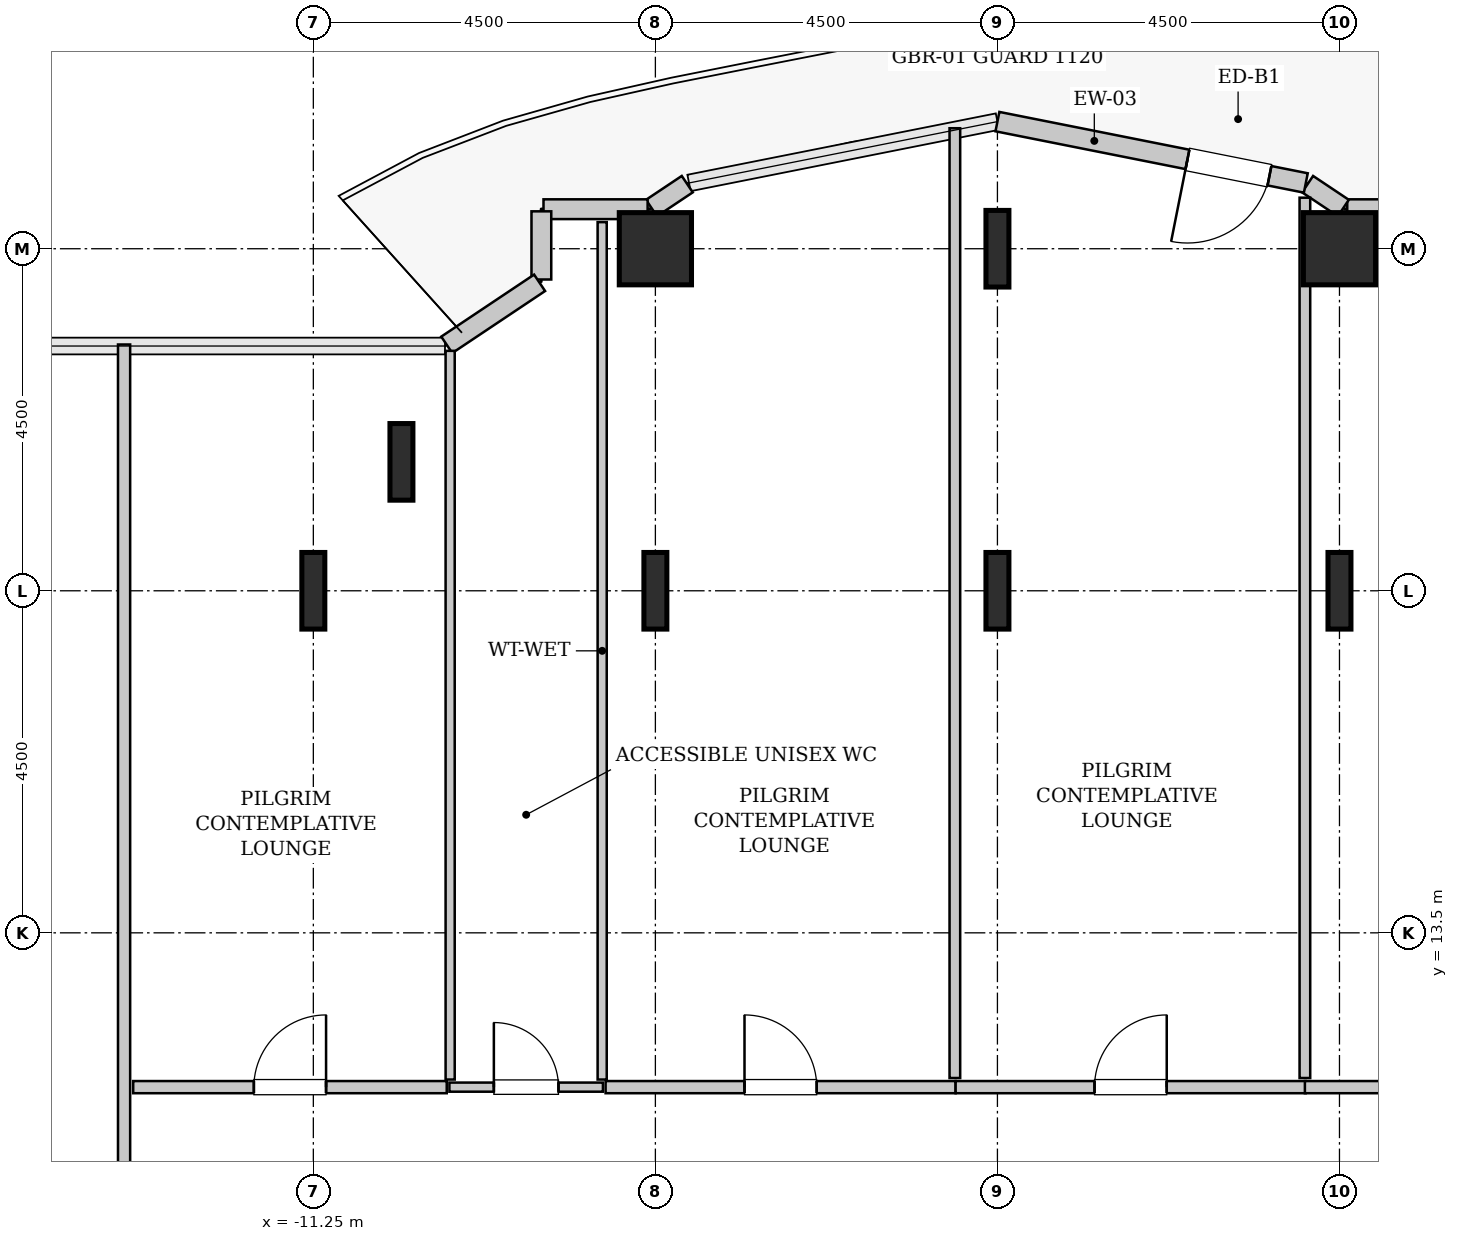
"""IFC4 building model, lengths in metres.
Left out: names, types, materials, properties, quantities, classifications, styles, units other than length and angle.
Written with IfcOpenShell. Run it as: python <this file> out.ifc"""

import sys

from ifc_helpers import new_model, si_unit, direction, frame, frame_2d, origin, origin_2d, place, context, subcontext, project, spatial, rectangle, hollow_rectangle, i_section, extrude, source, transform, mapped, element, fill, save


model = new_model("IFC4")
c1 = context("Model", 3, precision=1e-05, world=origin(), true_north=direction((0.0, 1.0)))
c2 = subcontext(c1, "Body", "Model", "MODEL_VIEW")
j1 = project(units=[si_unit("LENGTHUNIT", "METRE"), si_unit("PLANEANGLEUNIT", "RADIAN")], contexts=[c1])
p1 = place(None, origin())
s1 = spatial("IfcSite", under=j1, at=p1, CompositionType="ELEMENT")
p2 = place(p1, origin())
s2 = spatial("IfcBuilding", under=s1, at=p2, CompositionType="ELEMENT")
p3 = place(p2, frame((0.0, 0.0, 55.8)))
s3 = spatial("IfcBuildingStorey", under=s2, at=p3, CompositionType="ELEMENT", Elevation=55.8)
m1 = source(origin(), c2, "Body", "SweptSolid", [
    extrude(i_section(OverallWidth=0.302, OverallDepth=1.008, WebThickness=0.021, FlangeThickness=0.04, FilletRadius=0.03, at=origin_2d()), origin(), (0.0, 0.0, 1.0), 3.8),
])
for number, where, z_axis, x_axis in (
    (1, (-11.25, 18.0, 0.0), (0.0, 0.0, 1.0), (1.0, 0.0, 0.0)),
    (2, (-10.091, 19.696, 0.0), (0.0, 0.0, 1.0), (1.0, 0.0, 0.0)),
    (3, (-6.75, 18.0, 0.0), (0.0, 0.0, 1.0), (1.0, 0.0, 0.0)),
):
    element("IfcColumn", number, at=place(p3, frame(where, z_axis=z_axis, x_axis=x_axis)), inside=s3, PredefinedType="COLUMN", context=c2, shape_type="MappedRepresentation", body=[
        mapped(m1, transform((0.0, 0.0, 0.0), x_axis=(1.0, 0.0, 0.0), y_axis=(0.0, 1.0, 0.0), z_axis=(0.0, 0.0, 1.0), scale=1.0)),
    ])
m2 = source(origin(), c2, "Body", "SweptSolid", [
    extrude(hollow_rectangle(XDim=0.95, YDim=0.95, WallThickness=0.045, InnerFilletRadius=0.045, OuterFilletRadius=0.09, at=origin_2d()), origin(), (0.0, 0.0, 1.0), 3.8),
])
p4 = place(p3, frame((-6.75, 22.5, 0.0), z_axis=(0.0, 0.0, 1.0), x_axis=(1.0, 0.0, 0.0)))
e4 = element("IfcColumn", 4, at=p4, inside=s3, PredefinedType="COLUMN", context=c2, shape_type="MappedRepresentation", body=[
    mapped(m2, transform((0.0, 0.0, 0.0), x_axis=(1.0, 0.0, 0.0), y_axis=(0.0, 1.0, 0.0), z_axis=(0.0, 0.0, 1.0), scale=1.0)),
])
for number, where, z_axis, x_axis in (
    (5, (-2.25, 18.0, 0.0), (0.0, 0.0, 1.0), (1.0, 0.0, 0.0)),
    (6, (-2.25, 22.5, 0.0), (0.0, 0.0, 1.0), (1.0, 0.0, 0.0)),
    (7, (2.25, 18.0, 0.0), (0.0, 0.0, 1.0), (1.0, 0.0, 0.0)),
):
    element("IfcColumn", number, at=place(p3, frame(where, z_axis=z_axis, x_axis=x_axis)), inside=s3, PredefinedType="COLUMN", context=c2, shape_type="MappedRepresentation", body=[
        mapped(m1, transform((0.0, 0.0, 0.0), x_axis=(1.0, 0.0, 0.0), y_axis=(0.0, 1.0, 0.0), z_axis=(0.0, 0.0, 1.0), scale=1.0)),
    ])
p5 = place(p3, frame((2.25, 22.5, 0.0), z_axis=(0.0, 0.0, 1.0), x_axis=(1.0, 0.0, 0.0)))
e8 = element("IfcColumn", 8, at=p5, inside=s3, PredefinedType="COLUMN", context=c2, shape_type="MappedRepresentation", body=[
    mapped(m2, transform((0.0, 0.0, 0.0), x_axis=(1.0, 0.0, 0.0), y_axis=(0.0, 1.0, 0.0), z_axis=(0.0, 0.0, 1.0), scale=1.0)),
])
m3 = source(origin(), c2, "Body", "SweptSolid", [
    extrude(rectangle(XDim=1.37, YDim=0.26, at=frame_2d((0.685, 0.0))), origin(), (0.0, 0.0, 1.0), 3.55),
])
p6 = place(p3, frame((3.722, 23.02, 0.0), z_axis=(0.0, 0.0, 1.0), x_axis=(-1.0, 0.0, 0.0)))
e9 = element("IfcWall", 9, at=p6, inside=s3, PredefinedType="SOLIDWALL", context=c2, shape_type="MappedRepresentation", body=[
    mapped(m3, transform((0.0, 0.0, 0.0), x_axis=(1.0, 0.0, 0.0), y_axis=(0.0, 1.0, 0.0), z_axis=(0.0, 0.0, 1.0), scale=1.0)),
])
m4 = source(origin(), c2, "Body", "SweptSolid", [
    extrude(rectangle(XDim=0.565, YDim=0.26, at=frame_2d((0.283, 0.0))), origin(), (0.0, 0.0, 1.0), 3.55),
])
p7 = place(p3, frame((2.301, 23.036, 0.0), z_axis=(0.0, 0.0, 1.0), x_axis=(-0.831651492666, 0.555297933317, 0.0)))
e10 = element("IfcWall", 10, at=p7, inside=s3, PredefinedType="SOLIDWALL", context=c2, shape_type="MappedRepresentation", body=[
    mapped(m4, transform((0.0, 0.0, 0.0), x_axis=(1.0, 0.0, 0.0), y_axis=(0.0, 1.0, 0.0), z_axis=(0.0, 0.0, 1.0), scale=1.0)),
])
m5 = source(origin(), c2, "Body", "SweptSolid", [
    extrude(rectangle(XDim=4.137, YDim=0.26, at=frame_2d((2.068, 0.0))), origin(), (0.0, 0.0, 1.0), 3.55),
])
p8 = place(p3, frame((1.807, 23.365, 0.0), z_axis=(0.0, 0.0, 1.0), x_axis=(-0.980782170794, 0.195105954428, 0.0)))
e11 = element("IfcWall", 11, at=p8, inside=s3, PredefinedType="SOLIDWALL", context=c2, shape_type="MappedRepresentation", body=[
    mapped(m5, transform((0.0, 0.0, 0.0), x_axis=(1.0, 0.0, 0.0), y_axis=(0.0, 1.0, 0.0), z_axis=(0.0, 0.0, 1.0), scale=1.0)),
])
p9 = place(p8, frame((0.488, 0.0, 0.0)))
e12 = element("IfcOpeningElement", 12, at=p9, cuts=e11, PredefinedType="OPENING", context=c2, shape_type="SweptSolid", body=[
    extrude(rectangle(XDim=1.1, YDim=2.2, at=frame_2d((0.55, 1.1))), frame((0.0, 0.14, 0.0), z_axis=(0.0, -1.0, 0.0), x_axis=(1.0, 0.0, 0.0)), (0.0, 0.0, 1.0), 0.28),
])
p10 = place(p3, frame((-6.331, 23.35, 0.0), z_axis=(0.0, 0.0, 1.0), x_axis=(-0.831651492666, -0.555297933317, 0.0)))
e13 = element("IfcWall", 13, at=p10, inside=s3, PredefinedType="SOLIDWALL", context=c2, shape_type="MappedRepresentation", body=[
    mapped(m4, transform((0.0, 0.0, 0.0), x_axis=(1.0, 0.0, 0.0), y_axis=(0.0, 1.0, 0.0), z_axis=(0.0, 0.0, 1.0), scale=1.0)),
])
p11 = place(p3, frame((-6.852, 23.02, 0.0), z_axis=(0.0, 0.0, 1.0), x_axis=(-1.0, 0.0, 0.0)))
e14 = element("IfcWall", 14, at=p11, inside=s3, PredefinedType="SOLIDWALL", context=c2, shape_type="MappedRepresentation", body=[
    mapped(m3, transform((0.0, 0.0, 0.0), x_axis=(1.0, 0.0, 0.0), y_axis=(0.0, 1.0, 0.0), z_axis=(0.0, 0.0, 1.0), scale=1.0)),
])
m6 = source(origin(), c2, "Body", "SweptSolid", [
    extrude(rectangle(XDim=0.897, YDim=0.26, at=frame_2d((0.448, 0.0))), origin(), (0.0, 0.0, 1.0), 3.55),
])
p12 = place(p3, frame((-8.25, 22.992, 0.0), z_axis=(0.0, 0.0, 1.0), x_axis=(0.0, -1.0, 0.0)))
e15 = element("IfcWall", 15, at=p12, inside=s3, PredefinedType="SOLIDWALL", context=c2, shape_type="MappedRepresentation", body=[
    mapped(m6, transform((0.0, 0.0, 0.0), x_axis=(1.0, 0.0, 0.0), y_axis=(0.0, 1.0, 0.0), z_axis=(0.0, 0.0, 1.0), scale=1.0)),
])
m7 = source(origin(), c2, "Body", "SweptSolid", [
    extrude(rectangle(XDim=1.469, YDim=0.26, at=frame_2d((0.734, 0.0))), origin(), (0.0, 0.0, 1.0), 3.55),
])
p13 = place(p3, frame((-8.273, 22.052, 0.0), z_axis=(0.0, 0.0, 1.0), x_axis=(-0.831461760506, -0.555581983884, 0.0)))
e16 = element("IfcWall", 16, at=p13, inside=s3, PredefinedType="SOLIDWALL", context=c2, shape_type="MappedRepresentation", body=[
    mapped(m7, transform((0.0, 0.0, 0.0), x_axis=(1.0, 0.0, 0.0), y_axis=(0.0, 1.0, 0.0), z_axis=(0.0, 0.0, 1.0), scale=1.0)),
])
m8 = source(origin(), c2, "Body", "SweptSolid", [
    extrude(rectangle(XDim=2.02, YDim=0.12, at=frame_2d((1.01, 0.0))), origin(), (0.0, 0.0, 1.0), 3.535),
])
p14 = place(p3, frame((-9.46, 11.47, 0.0), z_axis=(0.0, 0.0, 1.0), x_axis=(1.0, 0.0, 0.0)))
e17 = element("IfcWall", 17, at=p14, inside=s3, PredefinedType="PLUMBINGWALL", context=c2, shape_type="MappedRepresentation", body=[
    mapped(m8, transform((0.0, 0.0, 0.0), x_axis=(1.0, 0.0, 0.0), y_axis=(0.0, 1.0, 0.0), z_axis=(0.0, 0.0, 1.0), scale=1.0)),
])
p15 = place(p14, frame((0.585, 0.0, 0.0)))
e18 = element("IfcOpeningElement", 18, at=p15, cuts=e17, PredefinedType="OPENING", context=c2, shape_type="SweptSolid", body=[
    extrude(rectangle(XDim=0.85, YDim=2.1, at=frame_2d((0.425, 1.05))), frame((0.0, 0.07, 0.0), z_axis=(0.0, -1.0, 0.0), x_axis=(1.0, 0.0, 0.0)), (0.0, 0.0, 1.0), 0.14),
])
m9 = source(origin(), c2, "Body", "SweptSolid", [
    extrude(rectangle(XDim=11.28, YDim=0.12, at=frame_2d((5.64, 0.0))), origin(), (0.0, 0.0, 1.0), 3.535),
])
p16 = place(p3, frame((-7.45, 11.57, 0.0), z_axis=(0.0, 0.0, 1.0), x_axis=(0.0, 1.0, 0.0)))
e19 = element("IfcWall", 19, at=p16, inside=s3, PredefinedType="PLUMBINGWALL", context=c2, shape_type="MappedRepresentation", body=[
    mapped(m9, transform((0.0, 0.0, 0.0), x_axis=(1.0, 0.0, 0.0), y_axis=(0.0, 1.0, 0.0), z_axis=(0.0, 0.0, 1.0), scale=1.0)),
])
m10 = source(origin(), c2, "Body", "SweptSolid", [
    extrude(rectangle(XDim=9.587, YDim=0.12, at=frame_2d((4.793, 0.0))), origin(), (0.0, 0.0, 1.0), 3.535),
])
p17 = place(p3, frame((-9.45, 11.57, 0.0), z_axis=(0.0, 0.0, 1.0), x_axis=(0.0, 1.0, 0.0)))
e20 = element("IfcWall", 20, at=p17, inside=s3, PredefinedType="PLUMBINGWALL", context=c2, shape_type="MappedRepresentation", body=[
    mapped(m10, transform((0.0, 0.0, 0.0), x_axis=(1.0, 0.0, 0.0), y_axis=(0.0, 1.0, 0.0), z_axis=(0.0, 0.0, 1.0), scale=1.0)),
])
m11 = source(origin(), c2, "Body", "SweptSolid", [
    extrude(rectangle(XDim=12.752, YDim=0.16, at=frame_2d((6.376, 0.0))), origin(), (0.0, 0.0, 1.0), 3.535),
])
p18 = place(p3, frame((-13.74, 8.488, 0.0), z_axis=(0.0, 0.0, 1.0), x_axis=(0.0, 1.0, 0.0)))
e21 = element("IfcWall", 21, at=p18, inside=s3, PredefinedType="PARTITIONING", context=c2, shape_type="MappedRepresentation", body=[
    mapped(m11, transform((0.0, 0.0, 0.0), x_axis=(1.0, 0.0, 0.0), y_axis=(0.0, 1.0, 0.0), z_axis=(0.0, 0.0, 1.0), scale=1.0)),
])
p19 = place(p18, frame((1.036, 0.0, 0.0)))
e22 = element("IfcOpeningElement", 22, at=p19, cuts=e21, PredefinedType="OPENING", context=c2, shape_type="SweptSolid", body=[
    extrude(rectangle(XDim=0.95, YDim=2.1, at=frame_2d((0.475, 1.05))), frame((0.0, 0.09, 0.0), z_axis=(0.0, -1.0, 0.0), x_axis=(1.0, 0.0, 0.0)), (0.0, 0.0, 1.0), 0.18),
])
m12 = source(origin(), c2, "Body", "SweptSolid", [
    extrude(rectangle(XDim=4.125, YDim=0.16, at=frame_2d((2.062, 0.0))), origin(), (0.0, 0.0, 1.0), 3.535),
])
p20 = place(p3, frame((-13.62, 11.47, 0.0), z_axis=(0.0, 0.0, 1.0), x_axis=(1.0, 0.0, 0.0)))
e23 = element("IfcWall", 23, at=p20, inside=s3, PredefinedType="PARTITIONING", context=c2, shape_type="MappedRepresentation", body=[
    mapped(m12, transform((0.0, 0.0, 0.0), x_axis=(1.0, 0.0, 0.0), y_axis=(0.0, 1.0, 0.0), z_axis=(0.0, 0.0, 1.0), scale=1.0)),
])
p21 = place(p20, frame((1.587, 0.0, 0.0)))
e24 = element("IfcOpeningElement", 24, at=p21, cuts=e23, PredefinedType="OPENING", context=c2, shape_type="SweptSolid", body=[
    extrude(rectangle(XDim=0.95, YDim=2.1, at=frame_2d((0.475, 1.05))), frame((0.0, 0.09, 0.0), z_axis=(0.0, -1.0, 0.0), x_axis=(1.0, 0.0, 0.0)), (0.0, 0.0, 1.0), 0.18),
])
m13 = source(origin(), c2, "Body", "SweptSolid", [
    extrude(rectangle(XDim=4.605, YDim=0.16, at=frame_2d((2.302, 0.0))), origin(), (0.0, 0.0, 1.0), 3.535),
])
p22 = place(p3, frame((-7.405, 11.47, 0.0), z_axis=(0.0, 0.0, 1.0), x_axis=(1.0, 0.0, 0.0)))
e25 = element("IfcWall", 25, at=p22, inside=s3, PredefinedType="PARTITIONING", context=c2, shape_type="MappedRepresentation", body=[
    mapped(m13, transform((0.0, 0.0, 0.0), x_axis=(1.0, 0.0, 0.0), y_axis=(0.0, 1.0, 0.0), z_axis=(0.0, 0.0, 1.0), scale=1.0)),
])
p23 = place(p22, frame((1.827, 0.0, 0.0)))
e26 = element("IfcOpeningElement", 26, at=p23, cuts=e25, PredefinedType="OPENING", context=c2, shape_type="SweptSolid", body=[
    extrude(rectangle(XDim=0.95, YDim=2.1, at=frame_2d((0.475, 1.05))), frame((0.0, 0.09, 0.0), z_axis=(0.0, -1.0, 0.0), x_axis=(1.0, 0.0, 0.0)), (0.0, 0.0, 1.0), 0.18),
])
m14 = source(origin(), c2, "Body", "SweptSolid", [
    extrude(rectangle(XDim=12.495, YDim=0.14, at=frame_2d((6.248, 0.0))), origin(), (0.0, 0.0, 1.0), 3.535),
])
p24 = place(p3, frame((-2.81, 11.59, 0.0), z_axis=(0.0, 0.0, 1.0), x_axis=(0.0, 1.0, 0.0)))
e27 = element("IfcWall", 27, at=p24, inside=s3, PredefinedType="PARTITIONING", context=c2, shape_type="MappedRepresentation", body=[
    mapped(m14, transform((0.0, 0.0, 0.0), x_axis=(1.0, 0.0, 0.0), y_axis=(0.0, 1.0, 0.0), z_axis=(0.0, 0.0, 1.0), scale=1.0)),
])
p25 = place(p3, frame((-2.8, 11.47, 0.0), z_axis=(0.0, 0.0, 1.0), x_axis=(1.0, 0.0, 0.0)))
e28 = element("IfcWall", 28, at=p25, inside=s3, PredefinedType="PARTITIONING", context=c2, shape_type="MappedRepresentation", body=[
    mapped(m13, transform((0.0, 0.0, 0.0), x_axis=(1.0, 0.0, 0.0), y_axis=(0.0, 1.0, 0.0), z_axis=(0.0, 0.0, 1.0), scale=1.0)),
])
p26 = place(p25, frame((1.827, 0.0, 0.0)))
e29 = element("IfcOpeningElement", 29, at=p26, cuts=e28, PredefinedType="OPENING", context=c2, shape_type="SweptSolid", body=[
    extrude(rectangle(XDim=0.95, YDim=2.1, at=frame_2d((0.475, 1.05))), frame((0.0, 0.09, 0.0), z_axis=(0.0, -1.0, 0.0), x_axis=(1.0, 0.0, 0.0)), (0.0, 0.0, 1.0), 0.18),
])
m15 = source(origin(), c2, "Body", "SweptSolid", [
    extrude(rectangle(XDim=11.581, YDim=0.14, at=frame_2d((5.791, 0.0))), origin(), (0.0, 0.0, 1.0), 2.825),
])
p27 = place(p3, frame((1.795, 11.59, 0.0), z_axis=(0.0, 0.0, 1.0), x_axis=(0.0, 1.0, 0.0)))
e30 = element("IfcWall", 30, at=p27, inside=s3, PredefinedType="PARTITIONING", context=c2, shape_type="MappedRepresentation", body=[
    mapped(m15, transform((0.0, 0.0, 0.0), x_axis=(1.0, 0.0, 0.0), y_axis=(0.0, 1.0, 0.0), z_axis=(0.0, 0.0, 1.0), scale=1.0)),
])
m16 = source(origin(), c2, "Body", "SweptSolid", [
    extrude(rectangle(XDim=6.01, YDim=0.16, at=frame_2d((3.005, 0.0))), origin(), (0.0, 0.0, 1.0), 3.535),
])
p28 = place(p3, frame((1.795, 11.47, 0.0), z_axis=(0.0, 0.0, 1.0), x_axis=(1.0, 0.0, 0.0)))
e31 = element("IfcWall", 31, at=p28, inside=s3, PredefinedType="PARTITIONING", context=c2, shape_type="MappedRepresentation", body=[
    mapped(m16, transform((0.0, 0.0, 0.0), x_axis=(1.0, 0.0, 0.0), y_axis=(0.0, 1.0, 0.0), z_axis=(0.0, 0.0, 1.0), scale=1.0)),
])
p29 = place(p28, frame((2.53, 0.0, 0.0)))
e32 = element("IfcOpeningElement", 32, at=p29, cuts=e31, PredefinedType="OPENING", context=c2, shape_type="SweptSolid", body=[
    extrude(rectangle(XDim=0.95, YDim=2.1, at=frame_2d((0.475, 1.05))), frame((0.0, 0.09, 0.0), z_axis=(0.0, -1.0, 0.0), x_axis=(1.0, 0.0, 0.0)), (0.0, 0.0, 1.0), 0.18),
])
m17 = source(origin(), c2, "Body", "SweptSolid", [
    extrude(rectangle(XDim=1.1, YDim=2.2, at=frame_2d((0.55, 1.1))), frame((0.0, 0.025, 0.0), z_axis=(0.0, -1.0, 0.0), x_axis=(1.0, 0.0, 0.0)), (0.0, 0.0, 1.0), 0.05),
])
p30 = place(p9, origin())
e33 = element("IfcDoor", 33, at=p30, inside=s3, OperationType="SINGLE_SWING_RIGHT", PredefinedType="DOOR", context=c2, shape_type="MappedRepresentation", body=[
    mapped(m17, transform((0.0, 0.0, 0.0), x_axis=(1.0, 0.0, 0.0), y_axis=(0.0, 1.0, 0.0), z_axis=(0.0, 0.0, 1.0), scale=1.0)),
])
fill(e12, e33)
m18 = source(origin(), c2, "Body", "SweptSolid", [
    extrude(rectangle(XDim=0.85, YDim=2.1, at=frame_2d((0.425, 1.05))), frame((0.0, 0.025, 0.0), z_axis=(0.0, -1.0, 0.0), x_axis=(1.0, 0.0, 0.0)), (0.0, 0.0, 1.0), 0.05),
])
p31 = place(p15, origin())
e34 = element("IfcDoor", 34, at=p31, inside=s3, OperationType="SINGLE_SWING_LEFT", PredefinedType="DOOR", context=c2, shape_type="MappedRepresentation", body=[
    mapped(m18, transform((0.0, 0.0, 0.0), x_axis=(1.0, 0.0, 0.0), y_axis=(0.0, 1.0, 0.0), z_axis=(0.0, 0.0, 1.0), scale=1.0)),
])
fill(e18, e34)
m19 = source(origin(), c2, "Body", "SweptSolid", [
    extrude(rectangle(XDim=0.95, YDim=2.1, at=frame_2d((0.475, 1.05))), frame((0.0, 0.025, 0.0), z_axis=(0.0, -1.0, 0.0), x_axis=(1.0, 0.0, 0.0)), (0.0, 0.0, 1.0), 0.05),
])
p32 = place(p21, origin())
e35 = element("IfcDoor", 35, at=p32, inside=s3, OperationType="SINGLE_SWING_RIGHT", PredefinedType="DOOR", context=c2, shape_type="MappedRepresentation", body=[
    mapped(m19, transform((0.0, 0.0, 0.0), x_axis=(1.0, 0.0, 0.0), y_axis=(0.0, 1.0, 0.0), z_axis=(0.0, 0.0, 1.0), scale=1.0)),
])
fill(e24, e35)
p33 = place(p23, origin())
e36 = element("IfcDoor", 36, at=p33, inside=s3, OperationType="SINGLE_SWING_LEFT", PredefinedType="DOOR", context=c2, shape_type="MappedRepresentation", body=[
    mapped(m19, transform((0.0, 0.0, 0.0), x_axis=(1.0, 0.0, 0.0), y_axis=(0.0, 1.0, 0.0), z_axis=(0.0, 0.0, 1.0), scale=1.0)),
])
fill(e26, e36)
p34 = place(p26, origin())
e37 = element("IfcDoor", 37, at=p34, inside=s3, OperationType="SINGLE_SWING_RIGHT", PredefinedType="DOOR", context=c2, shape_type="MappedRepresentation", body=[
    mapped(m19, transform((0.0, 0.0, 0.0), x_axis=(1.0, 0.0, 0.0), y_axis=(0.0, 1.0, 0.0), z_axis=(0.0, 0.0, 1.0), scale=1.0)),
])
fill(e29, e37)
save(model, sys.argv[1])
